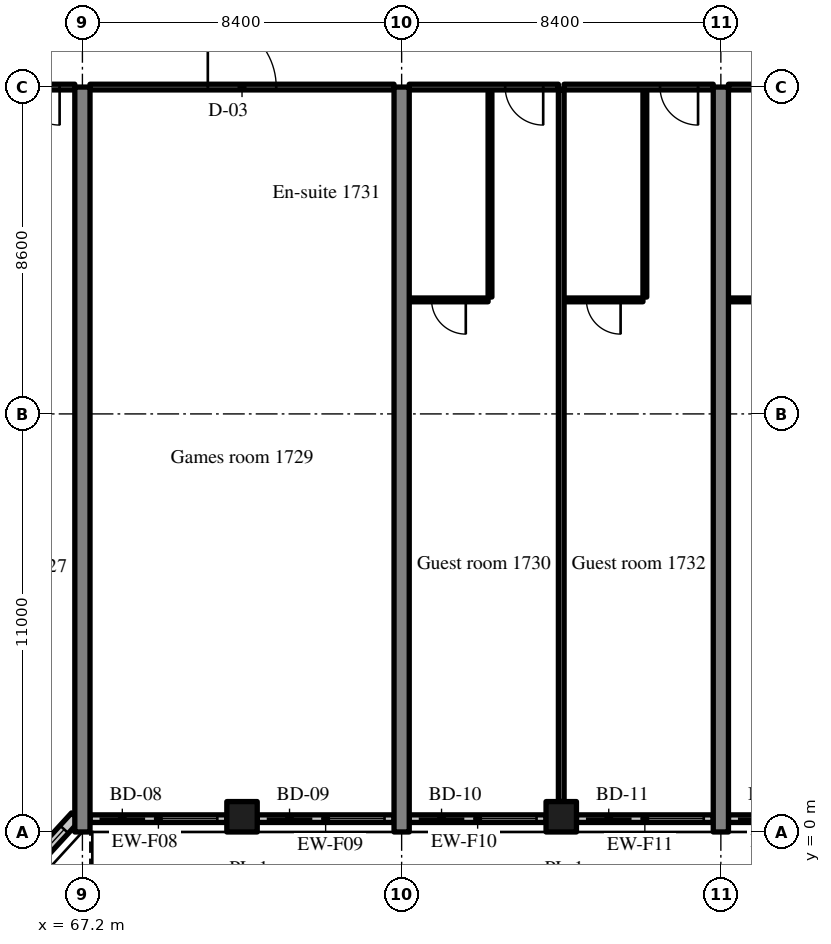
"""IFC4 building model, lengths in metres.
Left out: names, types, materials, properties, quantities, classifications, styles, units other than length and angle.
Written with IfcOpenShell. Run it as: python <this file> out.ifc"""

import sys

from ifc_helpers import new_model, si_unit, direction, frame, frame_2d, origin, origin_2d, place, context, subcontext, project, spatial, rectangle, extrude, source, transform, mapped, element, fill, save


model = new_model("IFC4")
c1 = context("Model", 3, precision=1e-05, world=origin(), true_north=direction((0.0, 1.0)))
c2 = subcontext(c1, "Body", "Model", "MODEL_VIEW")
j1 = project(units=[si_unit("LENGTHUNIT", "METRE"), si_unit("PLANEANGLEUNIT", "RADIAN")], contexts=[c1])
p1 = place(None, origin())
s1 = spatial("IfcSite", under=j1, at=p1, CompositionType="ELEMENT")
p2 = place(p1, origin())
s2 = spatial("IfcBuilding", under=s1, at=p2, CompositionType="ELEMENT")
p3 = place(p2, frame((0.0, 0.0, 73.4)))
s3 = spatial("IfcBuildingStorey", under=s2, at=p3, CompositionType="ELEMENT", Elevation=73.4)
m1 = source(origin(), c2, "Body", "SweptSolid", [
    extrude(rectangle(XDim=19.6, YDim=0.4, at=frame_2d((9.8, 0.0))), origin(), (0.0, 0.0, 1.0), 3.52),
])
for number, where, z_axis, x_axis in (
    (1, (67.2, 0.0, 0.0), (0.0, 0.0, 1.0), (0.0, 1.0, 0.0)),
    (2, (75.6, 0.0, 0.0), (0.0, 0.0, 1.0), (0.0, 1.0, 0.0)),
    (3, (84.0, 0.0, 0.0), (0.0, 0.0, 1.0), (0.0, 1.0, 0.0)),
):
    element("IfcWall", number, at=place(p3, frame(where, z_axis=z_axis, x_axis=x_axis)), inside=s3, PredefinedType="SHEAR", context=c2, shape_type="MappedRepresentation", body=[
        mapped(m1, transform((0.0, 0.0, 0.0), scale=1.0)),
    ])
m2 = source(origin(), c2, "Body", "SweptSolid", [
    extrude(rectangle(XDim=0.8, YDim=0.8, at=origin_2d()), origin(), (0.0, 0.0, 1.0), 3.52),
])
for number, where, z_axis, x_axis in (
    (4, (71.4, 0.4, 0.0), (0.0, 0.0, 1.0), (1.0, 0.0, 0.0)),
    (5, (79.8, 0.4, 0.0), (0.0, 0.0, 1.0), (1.0, 0.0, 0.0)),
):
    element("IfcColumn", number, at=place(p3, frame(where, z_axis=z_axis, x_axis=x_axis)), inside=s3, PredefinedType="COLUMN", context=c2, shape_type="MappedRepresentation", body=[
        mapped(m2, transform((0.0, 0.0, 0.0), scale=1.0)),
    ])
m3 = source(origin(), c2, "Body", "SweptSolid", [
    extrude(rectangle(XDim=2.398, YDim=0.3, at=frame_2d((1.199, 0.0))), origin(), (0.0, 0.0, 1.0), 3.52),
])
p4 = place(p3, frame((65.404, -1.369, 0.0), z_axis=(0.0, 0.0, 1.0), x_axis=(0.675374189419, 0.737475222815, 0.0)))
e6 = element("IfcWall", 6, at=p4, inside=s3, PredefinedType="SOLIDWALL", context=c2, shape_type="MappedRepresentation", body=[
    mapped(m3, transform((0.0, 0.0, 0.0), scale=1.0)),
])
m4 = source(origin(), c2, "Body", "SweptSolid", [
    extrude(rectangle(XDim=1.5, YDim=2.0, at=frame_2d((0.75, 1.0))), frame((0.0, 0.16, 0.0), z_axis=(0.0, -1.0, 0.0), x_axis=(1.0, 0.0, 0.0)), (0.0, 0.0, 1.0), 0.32),
])
p5 = place(p4, frame((0.449, 0.0, 0.9)))
e7 = element("IfcOpeningElement", 7, at=p5, cuts=e6, PredefinedType="OPENING", context=c2, shape_type="MappedRepresentation", body=[
    mapped(m4, transform((0.0, 0.0, 0.0), scale=1.0)),
])
m5 = source(origin(), c2, "Body", "SweptSolid", [
    extrude(rectangle(XDim=3.6, YDim=0.2, at=frame_2d((1.8, 0.0))), origin(), (0.0, 0.0, 1.0), 2.82),
])
p6 = place(p3, frame((67.4, 0.35, 0.0), z_axis=(0.0, 0.0, 1.0), x_axis=(1.0, 0.0, 0.0)))
e8 = element("IfcWall", 8, at=p6, inside=s3, PredefinedType="SOLIDWALL", context=c2, shape_type="MappedRepresentation", body=[
    mapped(m5, transform((0.0, 0.0, 0.0), scale=1.0)),
])
m6 = source(origin(), c2, "Body", "SweptSolid", [
    extrude(rectangle(XDim=1.2, YDim=2.4, at=frame_2d((0.6, 1.2))), frame((0.0, 0.11, 0.0), z_axis=(0.0, -1.0, 0.0), x_axis=(1.0, 0.0, 0.0)), (0.0, 0.0, 1.0), 0.22),
])
p7 = place(p6, frame((0.25, 0.0, 0.0)))
e9 = element("IfcOpeningElement", 9, at=p7, cuts=e8, PredefinedType="OPENING", context=c2, shape_type="MappedRepresentation", body=[
    mapped(m6, transform((0.0, 0.0, 0.0), scale=1.0)),
])
m7 = source(origin(), c2, "Body", "SweptSolid", [
    extrude(rectangle(XDim=1.5, YDim=1.5, at=frame_2d((0.75, 0.75))), frame((0.0, 0.11, 0.0), z_axis=(0.0, -1.0, 0.0), x_axis=(1.0, 0.0, 0.0)), (0.0, 0.0, 1.0), 0.22),
])
p8 = place(p6, frame((1.85, 0.0, 0.9)))
e10 = element("IfcOpeningElement", 10, at=p8, cuts=e8, PredefinedType="OPENING", context=c2, shape_type="MappedRepresentation", body=[
    mapped(m7, transform((0.0, 0.0, 0.0), scale=1.0)),
])
m8 = source(origin(), c2, "Body", "SweptSolid", [
    extrude(rectangle(XDim=3.6, YDim=0.2, at=frame_2d((1.8, 0.0))), origin(), (0.0, 0.0, 1.0), 2.82),
])
p9 = place(p3, frame((71.8, 0.35, 0.0), z_axis=(0.0, 0.0, 1.0), x_axis=(1.0, 0.0, 0.0)))
e11 = element("IfcWall", 11, at=p9, inside=s3, PredefinedType="SOLIDWALL", context=c2, shape_type="MappedRepresentation", body=[
    mapped(m8, transform((0.0, 0.0, 0.0), scale=1.0)),
])
p10 = place(p9, frame((0.25, 0.0, 0.0)))
e12 = element("IfcOpeningElement", 12, at=p10, cuts=e11, PredefinedType="OPENING", context=c2, shape_type="MappedRepresentation", body=[
    mapped(m6, transform((0.0, 0.0, 0.0), scale=1.0)),
])
p11 = place(p9, frame((1.85, 0.0, 0.9)))
e13 = element("IfcOpeningElement", 13, at=p11, cuts=e11, PredefinedType="OPENING", context=c2, shape_type="MappedRepresentation", body=[
    mapped(m7, transform((0.0, 0.0, 0.0), scale=1.0)),
])
p12 = place(p3, frame((75.8, 0.35, 0.0), z_axis=(0.0, 0.0, 1.0), x_axis=(1.0, 0.0, 0.0)))
e14 = element("IfcWall", 14, at=p12, inside=s3, PredefinedType="SOLIDWALL", context=c2, shape_type="MappedRepresentation", body=[
    mapped(m8, transform((0.0, 0.0, 0.0), scale=1.0)),
])
p13 = place(p12, frame((0.25, 0.0, 0.0)))
e15 = element("IfcOpeningElement", 15, at=p13, cuts=e14, PredefinedType="OPENING", context=c2, shape_type="MappedRepresentation", body=[
    mapped(m6, transform((0.0, 0.0, 0.0), scale=1.0)),
])
p14 = place(p12, frame((1.85, 0.0, 0.9)))
e16 = element("IfcOpeningElement", 16, at=p14, cuts=e14, PredefinedType="OPENING", context=c2, shape_type="MappedRepresentation", body=[
    mapped(m7, transform((0.0, 0.0, 0.0), scale=1.0)),
])
p15 = place(p3, frame((80.2, 0.35, 0.0), z_axis=(0.0, 0.0, 1.0), x_axis=(1.0, 0.0, 0.0)))
e17 = element("IfcWall", 17, at=p15, inside=s3, PredefinedType="SOLIDWALL", context=c2, shape_type="MappedRepresentation", body=[
    mapped(m5, transform((0.0, 0.0, 0.0), scale=1.0)),
])
p16 = place(p15, frame((0.25, 0.0, 0.0)))
e18 = element("IfcOpeningElement", 18, at=p16, cuts=e17, PredefinedType="OPENING", context=c2, shape_type="MappedRepresentation", body=[
    mapped(m6, transform((0.0, 0.0, 0.0), scale=1.0)),
])
p17 = place(p15, frame((1.85, 0.0, 0.9)))
e19 = element("IfcOpeningElement", 19, at=p17, cuts=e17, PredefinedType="OPENING", context=c2, shape_type="MappedRepresentation", body=[
    mapped(m7, transform((0.0, 0.0, 0.0), scale=1.0)),
])
p18 = place(p3, frame((84.2, 0.35, 0.0), z_axis=(0.0, 0.0, 1.0), x_axis=(1.0, 0.0, 0.0)))
e20 = element("IfcWall", 20, at=p18, inside=s3, PredefinedType="SOLIDWALL", context=c2, shape_type="MappedRepresentation", body=[
    mapped(m5, transform((0.0, 0.0, 0.0), scale=1.0)),
])
p19 = place(p18, frame((0.25, 0.0, 0.0)))
e21 = element("IfcOpeningElement", 21, at=p19, cuts=e20, PredefinedType="OPENING", context=c2, shape_type="MappedRepresentation", body=[
    mapped(m6, transform((0.0, 0.0, 0.0), scale=1.0)),
])
p20 = place(p18, frame((1.85, 0.0, 0.9)))
e22 = element("IfcOpeningElement", 22, at=p20, cuts=e20, PredefinedType="OPENING", context=c2, shape_type="MappedRepresentation", body=[
    mapped(m7, transform((0.0, 0.0, 0.0), scale=1.0)),
])
m9 = source(origin(), c2, "Body", "SweptSolid", [
    extrude(rectangle(XDim=3.925, YDim=0.15, at=frame_2d((1.962, 0.0))), origin(), (0.0, 0.0, 1.0), 2.82),
])
p21 = place(p3, frame((63.075, 19.6, 0.0), z_axis=(0.0, 0.0, 1.0), x_axis=(1.0, 0.0, 0.0)))
e23 = element("IfcWall", 23, at=p21, inside=s3, PredefinedType="PARTITIONING", context=c2, shape_type="MappedRepresentation", body=[
    mapped(m9, transform((0.0, 0.0, 0.0), scale=1.0)),
])
m10 = source(origin(), c2, "Body", "SweptSolid", [
    extrude(rectangle(XDim=1.0, YDim=2.1, at=frame_2d((0.5, 1.05))), frame((0.0, 0.085, 0.0), z_axis=(0.0, -1.0, 0.0), x_axis=(1.0, 0.0, 0.0)), (0.0, 0.0, 1.0), 0.17),
])
p22 = place(p21, frame((2.525, 0.0, 0.0)))
e24 = element("IfcOpeningElement", 24, at=p22, cuts=e23, PredefinedType="OPENING", context=c2, shape_type="MappedRepresentation", body=[
    mapped(m10, transform((0.0, 0.0, 0.0), scale=1.0)),
])
m11 = source(origin(), c2, "Body", "SweptSolid", [
    extrude(rectangle(XDim=8.0, YDim=0.15, at=frame_2d((4.0, 0.0))), origin(), (0.0, 0.0, 1.0), 2.82),
])
p23 = place(p3, frame((67.4, 19.6, 0.0), z_axis=(0.0, 0.0, 1.0), x_axis=(1.0, 0.0, 0.0)))
e25 = element("IfcWall", 25, at=p23, inside=s3, PredefinedType="PARTITIONING", context=c2, shape_type="MappedRepresentation", body=[
    mapped(m11, transform((0.0, 0.0, 0.0), scale=1.0)),
])
m12 = source(origin(), c2, "Body", "SweptSolid", [
    extrude(rectangle(XDim=1.8, YDim=2.1, at=frame_2d((0.9, 1.05))), frame((0.0, 0.085, 0.0), z_axis=(0.0, -1.0, 0.0), x_axis=(1.0, 0.0, 0.0)), (0.0, 0.0, 1.0), 0.17),
])
p24 = place(p23, frame((3.1, 0.0, 0.0)))
e26 = element("IfcOpeningElement", 26, at=p24, cuts=e25, PredefinedType="OPENING", context=c2, shape_type="MappedRepresentation", body=[
    mapped(m12, transform((0.0, 0.0, 0.0), scale=1.0)),
])
m13 = source(origin(), c2, "Body", "SweptSolid", [
    extrude(rectangle(XDim=5.45, YDim=0.1, at=frame_2d((2.725, 0.0))), origin(), (0.0, 0.0, 1.0), 3.52),
])
p25 = place(p3, frame((77.925, 14.075, 0.0), z_axis=(0.0, 0.0, 1.0), x_axis=(0.0, 1.0, 0.0)))
e27 = element("IfcWall", 27, at=p25, inside=s3, PredefinedType="PARTITIONING", context=c2, shape_type="MappedRepresentation", body=[
    mapped(m13, transform((0.0, 0.0, 0.0), scale=1.0)),
])
m14 = source(origin(), c2, "Body", "SweptSolid", [
    extrude(rectangle(XDim=2.075, YDim=0.1, at=frame_2d((1.038, 0.0))), origin(), (0.0, 0.0, 1.0), 3.52),
])
p26 = place(p3, frame((75.8, 14.0, 0.0), z_axis=(0.0, 0.0, 1.0), x_axis=(1.0, 0.0, 0.0)))
e28 = element("IfcWall", 28, at=p26, inside=s3, PredefinedType="PARTITIONING", context=c2, shape_type="MappedRepresentation", body=[
    mapped(m14, transform((0.0, 0.0, 0.0), scale=1.0)),
])
m15 = source(origin(), c2, "Body", "SweptSolid", [
    extrude(rectangle(XDim=0.9, YDim=2.1, at=frame_2d((0.45, 1.05))), frame((0.0, 0.06, 0.0), z_axis=(0.0, -1.0, 0.0), x_axis=(1.0, 0.0, 0.0)), (0.0, 0.0, 1.0), 0.12),
])
p27 = place(p26, frame((0.588, 0.0, 0.0)))
e29 = element("IfcOpeningElement", 29, at=p27, cuts=e28, PredefinedType="OPENING", context=c2, shape_type="MappedRepresentation", body=[
    mapped(m15, transform((0.0, 0.0, 0.0), scale=1.0)),
])
p28 = place(p3, frame((75.8, 19.6, 0.0), z_axis=(0.0, 0.0, 1.0), x_axis=(1.0, 0.0, 0.0)))
e30 = element("IfcWall", 30, at=p28, inside=s3, PredefinedType="PARTITIONING", context=c2, shape_type="MappedRepresentation", body=[
    mapped(m9, transform((0.0, 0.0, 0.0), scale=1.0)),
])
p29 = place(p28, frame((2.525, 0.0, 0.0)))
e31 = element("IfcOpeningElement", 31, at=p29, cuts=e30, PredefinedType="OPENING", context=c2, shape_type="MappedRepresentation", body=[
    mapped(m10, transform((0.0, 0.0, 0.0), scale=1.0)),
])
p30 = place(p3, frame((82.0, 14.075, 0.0), z_axis=(0.0, 0.0, 1.0), x_axis=(0.0, 1.0, 0.0)))
e32 = element("IfcWall", 32, at=p30, inside=s3, PredefinedType="PARTITIONING", context=c2, shape_type="MappedRepresentation", body=[
    mapped(m13, transform((0.0, 0.0, 0.0), scale=1.0)),
])
p31 = place(p3, frame((79.875, 14.0, 0.0), z_axis=(0.0, 0.0, 1.0), x_axis=(1.0, 0.0, 0.0)))
e33 = element("IfcWall", 33, at=p31, inside=s3, PredefinedType="PARTITIONING", context=c2, shape_type="MappedRepresentation", body=[
    mapped(m14, transform((0.0, 0.0, 0.0), scale=1.0)),
])
p32 = place(p31, frame((0.587, 0.0, 0.0)))
e34 = element("IfcOpeningElement", 34, at=p32, cuts=e33, PredefinedType="OPENING", context=c2, shape_type="MappedRepresentation", body=[
    mapped(m15, transform((0.0, 0.0, 0.0), scale=1.0)),
])
p33 = place(p3, frame((79.875, 19.6, 0.0), z_axis=(0.0, 0.0, 1.0), x_axis=(1.0, 0.0, 0.0)))
e35 = element("IfcWall", 35, at=p33, inside=s3, PredefinedType="PARTITIONING", context=c2, shape_type="MappedRepresentation", body=[
    mapped(m9, transform((0.0, 0.0, 0.0), scale=1.0)),
])
p34 = place(p33, frame((2.525, 0.0, 0.0)))
e36 = element("IfcOpeningElement", 36, at=p34, cuts=e35, PredefinedType="OPENING", context=c2, shape_type="MappedRepresentation", body=[
    mapped(m10, transform((0.0, 0.0, 0.0), scale=1.0)),
])
m16 = source(origin(), c2, "Body", "SweptSolid", [
    extrude(rectangle(XDim=18.725, YDim=0.15, at=frame_2d((9.362, 0.0))), origin(), (0.0, 0.0, 1.0), 3.52),
])
p35 = place(p3, frame((79.8, 0.8, 0.0), z_axis=(0.0, 0.0, 1.0), x_axis=(0.0, 1.0, 0.0)))
e37 = element("IfcWall", 37, at=p35, inside=s3, PredefinedType="PARTITIONING", context=c2, shape_type="MappedRepresentation", body=[
    mapped(m16, transform((0.0, 0.0, 0.0), scale=1.0)),
])
m17 = source(origin(), c2, "Body", "SweptSolid", [
    extrude(rectangle(XDim=2.55, YDim=0.1, at=frame_2d((1.275, 0.0))), origin(), (0.0, 0.0, 1.0), 3.52),
])
p36 = place(p3, frame((84.2, 14.0, 0.0), z_axis=(0.0, 0.0, 1.0), x_axis=(1.0, 0.0, 0.0)))
e38 = element("IfcWall", 38, at=p36, inside=s3, PredefinedType="PARTITIONING", context=c2, shape_type="MappedRepresentation", body=[
    mapped(m17, transform((0.0, 0.0, 0.0), scale=1.0)),
])
p37 = place(p36, frame((0.825, 0.0, 0.0)))
e39 = element("IfcOpeningElement", 39, at=p37, cuts=e38, PredefinedType="OPENING", context=c2, shape_type="MappedRepresentation", body=[
    mapped(m15, transform((0.0, 0.0, 0.0), scale=1.0)),
])
p38 = place(p3, frame((84.2, 19.6, 0.0), z_axis=(0.0, 0.0, 1.0), x_axis=(1.0, 0.0, 0.0)))
e40 = element("IfcWall", 40, at=p38, inside=s3, PredefinedType="PARTITIONING", context=c2, shape_type="MappedRepresentation", body=[
    mapped(m11, transform((0.0, 0.0, 0.0), scale=1.0)),
])
p39 = place(p38, frame((6.6, 0.0, 0.0)))
e41 = element("IfcOpeningElement", 41, at=p39, cuts=e40, PredefinedType="OPENING", context=c2, shape_type="MappedRepresentation", body=[
    mapped(m10, transform((0.0, 0.0, 0.0), scale=1.0)),
])
m18 = source(origin(), c2, "Body", "SweptSolid", [
    extrude(rectangle(XDim=1.5, YDim=2.0, at=frame_2d((0.75, 1.0))), frame((0.0, 0.03, 0.0), z_axis=(0.0, -1.0, 0.0), x_axis=(1.0, 0.0, 0.0)), (0.0, 0.0, 1.0), 0.06),
])
p40 = place(p5, origin())
e42 = element("IfcWindow", 42, at=p40, inside=s3, PartitioningType="SINGLE_PANEL", PredefinedType="WINDOW", context=c2, shape_type="MappedRepresentation", body=[
    mapped(m18, transform((0.0, 0.0, 0.0), scale=1.0)),
])
fill(e7, e42)
m19 = source(origin(), c2, "Body", "SweptSolid", [
    extrude(rectangle(XDim=1.2, YDim=2.4, at=frame_2d((0.6, 1.2))), frame((0.0, 0.025, 0.0), z_axis=(0.0, -1.0, 0.0), x_axis=(1.0, 0.0, 0.0)), (0.0, 0.0, 1.0), 0.05),
])
p41 = place(p7, origin())
e43 = element("IfcDoor", 43, at=p41, inside=s3, OperationType="SLIDING_TO_RIGHT", PredefinedType="DOOR", context=c2, shape_type="MappedRepresentation", body=[
    mapped(m19, transform((0.0, 0.0, 0.0), scale=1.0)),
])
fill(e9, e43)
m20 = source(origin(), c2, "Body", "SweptSolid", [
    extrude(rectangle(XDim=1.5, YDim=1.5, at=frame_2d((0.75, 0.75))), frame((0.0, 0.03, 0.0), z_axis=(0.0, -1.0, 0.0), x_axis=(1.0, 0.0, 0.0)), (0.0, 0.0, 1.0), 0.06),
])
p42 = place(p8, origin())
e44 = element("IfcWindow", 44, at=p42, inside=s3, PartitioningType="SINGLE_PANEL", PredefinedType="WINDOW", context=c2, shape_type="MappedRepresentation", body=[
    mapped(m20, transform((0.0, 0.0, 0.0), scale=1.0)),
])
fill(e10, e44)
p43 = place(p10, origin())
e45 = element("IfcDoor", 45, at=p43, inside=s3, OperationType="SLIDING_TO_LEFT", PredefinedType="DOOR", context=c2, shape_type="MappedRepresentation", body=[
    mapped(m19, transform((0.0, 0.0, 0.0), scale=1.0)),
])
fill(e12, e45)
p44 = place(p11, origin())
e46 = element("IfcWindow", 46, at=p44, inside=s3, PartitioningType="SINGLE_PANEL", PredefinedType="WINDOW", context=c2, shape_type="MappedRepresentation", body=[
    mapped(m20, transform((0.0, 0.0, 0.0), scale=1.0)),
])
fill(e13, e46)
p45 = place(p13, origin())
e47 = element("IfcDoor", 47, at=p45, inside=s3, OperationType="SLIDING_TO_RIGHT", PredefinedType="DOOR", context=c2, shape_type="MappedRepresentation", body=[
    mapped(m19, transform((0.0, 0.0, 0.0), scale=1.0)),
])
fill(e15, e47)
p46 = place(p14, origin())
e48 = element("IfcWindow", 48, at=p46, inside=s3, PartitioningType="SINGLE_PANEL", PredefinedType="WINDOW", context=c2, shape_type="MappedRepresentation", body=[
    mapped(m20, transform((0.0, 0.0, 0.0), scale=1.0)),
])
fill(e16, e48)
p47 = place(p16, origin())
e49 = element("IfcDoor", 49, at=p47, inside=s3, OperationType="SLIDING_TO_LEFT", PredefinedType="DOOR", context=c2, shape_type="MappedRepresentation", body=[
    mapped(m19, transform((0.0, 0.0, 0.0), scale=1.0)),
])
fill(e18, e49)
p48 = place(p17, origin())
e50 = element("IfcWindow", 50, at=p48, inside=s3, PartitioningType="SINGLE_PANEL", PredefinedType="WINDOW", context=c2, shape_type="MappedRepresentation", body=[
    mapped(m20, transform((0.0, 0.0, 0.0), scale=1.0)),
])
fill(e19, e50)
p49 = place(p19, origin())
e51 = element("IfcDoor", 51, at=p49, inside=s3, OperationType="SLIDING_TO_RIGHT", PredefinedType="DOOR", context=c2, shape_type="MappedRepresentation", body=[
    mapped(m19, transform((0.0, 0.0, 0.0), scale=1.0)),
])
fill(e21, e51)
m21 = source(origin(), c2, "Body", "SweptSolid", [
    extrude(rectangle(XDim=1.0, YDim=2.1, at=frame_2d((0.5, 1.05))), frame((0.0, 0.025, 0.0), z_axis=(0.0, -1.0, 0.0), x_axis=(1.0, 0.0, 0.0)), (0.0, 0.0, 1.0), 0.05),
])
p50 = place(p22, origin())
e52 = element("IfcDoor", 52, at=p50, inside=s3, OperationType="SINGLE_SWING_RIGHT", PredefinedType="DOOR", context=c2, shape_type="MappedRepresentation", body=[
    mapped(m21, transform((0.0, 0.0, 0.0), scale=1.0)),
])
fill(e24, e52)
m22 = source(origin(), c2, "Body", "SweptSolid", [
    extrude(rectangle(XDim=1.8, YDim=2.1, at=frame_2d((0.9, 1.05))), frame((0.0, 0.025, 0.0), z_axis=(0.0, -1.0, 0.0), x_axis=(1.0, 0.0, 0.0)), (0.0, 0.0, 1.0), 0.05),
])
p51 = place(p24, origin())
e53 = element("IfcDoor", 53, at=p51, inside=s3, OperationType="DOUBLE_DOOR_SINGLE_SWING", PredefinedType="DOOR", context=c2, shape_type="MappedRepresentation", body=[
    mapped(m22, transform((0.0, 0.0, 0.0), scale=1.0)),
])
fill(e26, e53)
m23 = source(origin(), c2, "Body", "SweptSolid", [
    extrude(rectangle(XDim=0.9, YDim=2.1, at=frame_2d((0.45, 1.05))), frame((0.0, 0.025, 0.0), z_axis=(0.0, -1.0, 0.0), x_axis=(1.0, 0.0, 0.0)), (0.0, 0.0, 1.0), 0.05),
])
p52 = place(p27, origin())
e54 = element("IfcDoor", 54, at=p52, inside=s3, OperationType="SINGLE_SWING_RIGHT", PredefinedType="DOOR", context=c2, shape_type="MappedRepresentation", body=[
    mapped(m23, transform((0.0, 0.0, 0.0), scale=1.0)),
])
fill(e29, e54)
p53 = place(p29, origin())
e55 = element("IfcDoor", 55, at=p53, inside=s3, OperationType="SINGLE_SWING_RIGHT", PredefinedType="DOOR", context=c2, shape_type="MappedRepresentation", body=[
    mapped(m21, transform((0.0, 0.0, 0.0), scale=1.0)),
])
fill(e31, e55)
p54 = place(p32, origin())
e56 = element("IfcDoor", 56, at=p54, inside=s3, OperationType="SINGLE_SWING_RIGHT", PredefinedType="DOOR", context=c2, shape_type="MappedRepresentation", body=[
    mapped(m23, transform((0.0, 0.0, 0.0), scale=1.0)),
])
fill(e34, e56)
p55 = place(p34, origin())
e57 = element("IfcDoor", 57, at=p55, inside=s3, OperationType="SINGLE_SWING_RIGHT", PredefinedType="DOOR", context=c2, shape_type="MappedRepresentation", body=[
    mapped(m21, transform((0.0, 0.0, 0.0), scale=1.0)),
])
fill(e36, e57)
save(model, sys.argv[1])
